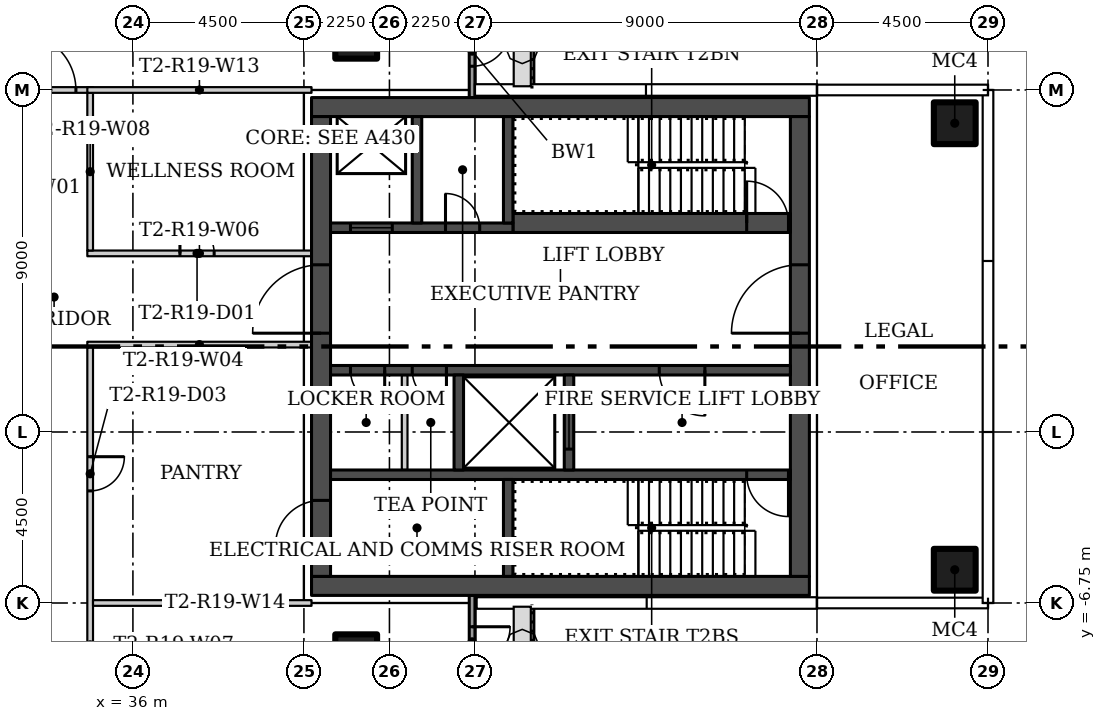
"""IFC4 building model, lengths in metres.
Left out: names, types, materials, properties, quantities, classifications, styles, units other than length and angle.
Written with IfcOpenShell. Run it as: python <this file> out.ifc"""

import sys

from ifc_helpers import new_model, si_unit, direction, frame, frame_2d, origin, origin_2d, place, context, subcontext, project, spatial, rectangle, hollow_rectangle, extrude, element, fill, save


model = new_model("IFC4")
c1 = context("Model", 3, precision=1e-05, world=origin(), true_north=direction((0.0, 1.0)))
c2 = subcontext(c1, "Body", "Model", "MODEL_VIEW")
j1 = project(units=[si_unit("LENGTHUNIT", "METRE"), si_unit("PLANEANGLEUNIT", "RADIAN")], contexts=[c1])
p1 = place(None, origin())
s1 = spatial("IfcSite", under=j1, at=p1, CompositionType="ELEMENT")
p2 = place(p1, origin())
s2 = spatial("IfcBuilding", under=s1, at=p2, CompositionType="ELEMENT")
p3 = place(p2, frame((0.0, 0.0, 174.0)))
s3 = spatial("IfcBuildingStorey", under=s2, at=p3, CompositionType="ELEMENT", Elevation=174.0)
for number, where in (
    (1, (41.875, 8.125, 0.0)),
    (2, (41.875, -8.125, 0.0)),
    (3, (57.625, -5.875, 0.0)),
    (4, (57.625, 5.875, 0.0)),
):
    element("IfcColumn", number, at=place(p3, frame(where)), inside=s3, PredefinedType="COLUMN", context=c2, shape_type="SweptSolid", body=[
        extrude(hollow_rectangle(XDim=1.1, YDim=1.1, WallThickness=0.04, at=origin_2d()), origin(), (0.0, 0.0, 1.0), 3.45),
    ])
p4 = place(p3, frame((40.7, 0.05, 0.0), z_axis=(0.0, 0.0, 1.0), x_axis=(-1.0, 0.0, 0.0)))
e5 = element("IfcWall", 5, at=p4, inside=s3, PredefinedType="PARTITIONING", context=c2, shape_type="SweptSolid", body=[
    extrude(rectangle(XDim=5.9, YDim=0.15, at=frame_2d((2.95, 0.0))), origin(), (0.0, 0.0, 1.0), 3.45),
])
p5 = place(p3, frame((34.8, 2.45, 0.0)))
e6 = element("IfcWall", 6, at=p5, inside=s3, PredefinedType="PARTITIONING", context=c2, shape_type="SweptSolid", body=[
    extrude(rectangle(XDim=5.9, YDim=0.15, at=frame_2d((2.95, 0.0))), origin(), (0.0, 0.0, 1.0), 3.45),
])
p6 = place(p5, frame((2.438, 0.0, 0.0)))
e7 = element("IfcOpeningElement", 7, at=p6, cuts=e6, PredefinedType="OPENING", context=c2, shape_type="SweptSolid", body=[
    extrude(rectangle(XDim=0.9, YDim=2.1, at=frame_2d((0.45, 1.05))), frame((0.0, 0.085, 0.0), z_axis=(0.0, -1.0, 0.0), x_axis=(1.0, 0.0, 0.0)), (0.0, 0.0, 1.0), 0.17),
])
p7 = place(p3, frame((34.875, -0.025, 0.0), z_axis=(0.0, 0.0, 1.0), x_axis=(0.0, -1.0, 0.0)))
e8 = element("IfcWall", 8, at=p7, inside=s3, PredefinedType="PARTITIONING", context=c2, shape_type="SweptSolid", body=[
    extrude(rectangle(XDim=15.65, YDim=0.15, at=frame_2d((7.825, 0.0))), origin(), (0.0, 0.0, 1.0), 3.45),
])
p8 = place(p7, frame((10.725, 0.0, 0.0)))
e9 = element("IfcOpeningElement", 9, at=p8, cuts=e8, PredefinedType="OPENING", context=c2, shape_type="SweptSolid", body=[
    extrude(rectangle(XDim=1.0, YDim=2.4, at=frame_2d((0.5, 1.2))), frame((0.0, 0.085, 0.0), z_axis=(0.0, -1.0, 0.0), x_axis=(1.0, 0.0, 0.0)), (0.0, 0.0, 1.0), 0.17),
])
p9 = place(p7, frame((2.875, 0.0, 0.0)))
e10 = element("IfcOpeningElement", 10, at=p9, cuts=e8, PredefinedType="OPENING", context=c2, shape_type="SweptSolid", body=[
    extrude(rectangle(XDim=0.9, YDim=2.1, at=frame_2d((0.45, 1.05))), frame((0.0, 0.085, 0.0), z_axis=(0.0, -1.0, 0.0), x_axis=(1.0, 0.0, 0.0)), (0.0, 0.0, 1.0), 0.17),
])
p10 = place(p3, frame((34.875, 6.675, 0.0), z_axis=(0.0, 0.0, 1.0), x_axis=(0.0, -1.0, 0.0)))
e11 = element("IfcWall", 11, at=p10, inside=s3, PredefinedType="PARTITIONING", context=c2, shape_type="SweptSolid", body=[
    extrude(rectangle(XDim=4.15, YDim=0.15, at=frame_2d((2.075, 0.0))), origin(), (0.0, 0.0, 1.0), 3.45),
])
p11 = place(p3, frame((32.575, 6.75, 0.0)))
e12 = element("IfcWall", 12, at=p11, inside=s3, PredefinedType="PARTITIONING", context=c2, shape_type="SweptSolid", body=[
    extrude(rectangle(XDim=2.375, YDim=0.15, at=frame_2d((1.188, 0.0))), origin(), (0.0, 0.0, 1.0), 3.45),
])
p12 = place(p11, frame((0.425, 0.0, 0.0)))
e13 = element("IfcOpeningElement", 13, at=p12, cuts=e12, PredefinedType="OPENING", context=c2, shape_type="SweptSolid", body=[
    extrude(rectangle(XDim=1.5, YDim=2.1, at=frame_2d((0.75, 1.05))), frame((0.0, 0.085, 0.0), z_axis=(0.0, -1.0, 0.0), x_axis=(1.0, 0.0, 0.0)), (0.0, 0.0, 1.0), 0.17),
])
p13 = place(p3, frame((40.7, 6.75, 0.0), z_axis=(0.0, 0.0, 1.0), x_axis=(-1.0, 0.0, 0.0)))
e14 = element("IfcWall", 14, at=p13, inside=s3, PredefinedType="PARTITIONING", context=c2, shape_type="SweptSolid", body=[
    extrude(rectangle(XDim=5.9, YDim=0.15, at=frame_2d((2.95, 0.0))), origin(), (0.0, 0.0, 1.0), 3.45),
])
p14 = place(p3, frame((34.95, -6.75, 0.0)))
e15 = element("IfcWall", 15, at=p14, inside=s3, PredefinedType="PARTITIONING", context=c2, shape_type="SweptSolid", body=[
    extrude(rectangle(XDim=5.75, YDim=0.15, at=frame_2d((2.875, 0.0))), origin(), (0.0, 0.0, 1.0), 3.45),
])
p15 = place(p3, frame((44.925, 9.0, 0.0), z_axis=(0.0, 0.0, 1.0), x_axis=(0.0, -1.0, 0.0)))
e16 = element("IfcWall", 16, at=p15, inside=s3, PredefinedType="SOLIDWALL", context=c2, shape_type="SweptSolid", body=[
    extrude(rectangle(XDim=2.457, YDim=0.15, at=frame_2d((1.229, 0.0))), origin(), (0.0, 0.0, 1.0), 3.45),
])
p16 = place(p15, frame((0.625, 0.0, 0.0)))
e17 = element("IfcOpeningElement", 17, at=p16, cuts=e16, PredefinedType="OPENING", context=c2, shape_type="SweptSolid", body=[
    extrude(rectangle(XDim=1.0, YDim=2.4, at=frame_2d((0.5, 1.2))), frame((0.0, 0.085, 0.0), z_axis=(0.0, -1.0, 0.0), x_axis=(1.0, 0.0, 0.0)), (0.0, 0.0, 1.0), 0.17),
])
p17 = place(p3, frame((44.925, -6.543, 0.0), z_axis=(0.0, 0.0, 1.0), x_axis=(0.0, -1.0, 0.0)))
e18 = element("IfcWall", 18, at=p17, inside=s3, PredefinedType="SOLIDWALL", context=c2, shape_type="SweptSolid", body=[
    extrude(rectangle(XDim=2.457, YDim=0.15, at=frame_2d((1.229, 0.0))), origin(), (0.0, 0.0, 1.0), 3.45),
])
p18 = place(p17, frame((0.832, 0.0, 0.0)))
e19 = element("IfcOpeningElement", 19, at=p18, cuts=e18, PredefinedType="OPENING", context=c2, shape_type="SweptSolid", body=[
    extrude(rectangle(XDim=1.0, YDim=2.4, at=frame_2d((0.5, 1.2))), frame((0.0, 0.085, 0.0), z_axis=(0.0, -1.0, 0.0), x_axis=(1.0, 0.0, 0.0)), (0.0, 0.0, 1.0), 0.17),
])
for number, where, z_axis, x_axis in (
    (20, (53.8, -6.3, 0.0), (0.0, 0.0, 1.0), (-1.0, 0.0, 0.0)),
    (21, (53.8, 6.3, 0.0), (0.0, 0.0, 1.0), (-1.0, 0.0, 0.0)),
):
    element("IfcWall", number, at=place(p3, frame(where, z_axis=z_axis, x_axis=x_axis)), inside=s3, PredefinedType="SHEAR", context=c2, shape_type="SweptSolid", body=[
        extrude(rectangle(XDim=13.1, YDim=0.5, at=frame_2d((6.55, 0.0))), origin(), (0.0, 0.0, 1.0), 3.45),
    ])
p19 = place(p3, frame((53.55, -6.05, 0.0), z_axis=(0.0, 0.0, 1.0), x_axis=(0.0, 1.0, 0.0)))
e22 = element("IfcWall", 22, at=p19, inside=s3, PredefinedType="SHEAR", context=c2, shape_type="SweptSolid", body=[
    extrude(rectangle(XDim=12.1, YDim=0.5, at=frame_2d((6.05, 0.0))), origin(), (0.0, 0.0, 1.0), 3.45),
])
p20 = place(p19, frame((6.4, 0.0, 0.0)))
e23 = element("IfcOpeningElement", 23, at=p20, cuts=e22, PredefinedType="OPENING", context=c2, shape_type="SweptSolid", body=[
    extrude(rectangle(XDim=1.8, YDim=2.4, at=frame_2d((0.9, 1.2))), frame((0.0, 0.26, 0.0), z_axis=(0.0, -1.0, 0.0), x_axis=(1.0, 0.0, 0.0)), (0.0, 0.0, 1.0), 0.52),
])
p21 = place(p3, frame((40.95, -6.05, 0.0), z_axis=(0.0, 0.0, 1.0), x_axis=(0.0, 1.0, 0.0)))
e24 = element("IfcWall", 24, at=p21, inside=s3, PredefinedType="SHEAR", context=c2, shape_type="SweptSolid", body=[
    extrude(rectangle(XDim=12.1, YDim=0.5, at=frame_2d((6.05, 0.0))), origin(), (0.0, 0.0, 1.0), 3.45),
])
p22 = place(p21, frame((0.8, 0.0, 0.0)))
e25 = element("IfcOpeningElement", 25, at=p22, cuts=e24, PredefinedType="OPENING", context=c2, shape_type="SweptSolid", body=[
    extrude(rectangle(XDim=1.2, YDim=2.1, at=frame_2d((0.6, 1.05))), frame((0.0, 0.26, 0.0), z_axis=(0.0, -1.0, 0.0), x_axis=(1.0, 0.0, 0.0)), (0.0, 0.0, 1.0), 0.52),
])
p23 = place(p21, frame((6.4, 0.0, 0.0)))
e26 = element("IfcOpeningElement", 26, at=p23, cuts=e24, PredefinedType="OPENING", context=c2, shape_type="SweptSolid", body=[
    extrude(rectangle(XDim=1.8, YDim=2.4, at=frame_2d((0.9, 1.2))), frame((0.0, 0.26, 0.0), z_axis=(0.0, -1.0, 0.0), x_axis=(1.0, 0.0, 0.0)), (0.0, 0.0, 1.0), 0.52),
])
p24 = place(p3, frame((53.3, -3.375, 0.0), z_axis=(0.0, 0.0, 1.0), x_axis=(-1.0, 0.0, 0.0)))
e27 = element("IfcWall", 27, at=p24, inside=s3, PredefinedType="SHEAR", context=c2, shape_type="SweptSolid", body=[
    extrude(rectangle(XDim=12.1, YDim=0.25, at=frame_2d((6.05, 0.0))), origin(), (0.0, 0.0, 1.0), 3.45),
])
p25 = place(p24, frame((0.05, 0.0, 0.0)))
e28 = element("IfcOpeningElement", 28, at=p25, cuts=e27, PredefinedType="OPENING", context=c2, shape_type="SweptSolid", body=[
    extrude(rectangle(XDim=1.1, YDim=2.1, at=frame_2d((0.55, 1.05))), frame((0.0, 0.135, 0.0), z_axis=(0.0, -1.0, 0.0), x_axis=(1.0, 0.0, 0.0)), (0.0, 0.0, 1.0), 0.27),
])
p26 = place(p3, frame((45.875, -6.05, 0.0), z_axis=(0.0, 0.0, 1.0), x_axis=(0.0, 1.0, 0.0)))
e29 = element("IfcWall", 29, at=p26, inside=s3, PredefinedType="SHEAR", context=c2, shape_type="SweptSolid", body=[
    extrude(rectangle(XDim=2.55, YDim=0.25, at=frame_2d((1.275, 0.0))), origin(), (0.0, 0.0, 1.0), 3.45),
])
p27 = place(p3, frame((53.3, -0.625, 0.0), z_axis=(0.0, 0.0, 1.0), x_axis=(-1.0, 0.0, 0.0)))
e30 = element("IfcWall", 30, at=p27, inside=s3, PredefinedType="SHEAR", context=c2, shape_type="SweptSolid", body=[
    extrude(rectangle(XDim=12.1, YDim=0.25, at=frame_2d((6.05, 0.0))), origin(), (0.0, 0.0, 1.0), 3.45),
])
p28 = place(p27, frame((2.25, 0.0, 0.0)))
e31 = element("IfcOpeningElement", 31, at=p28, cuts=e30, PredefinedType="OPENING", context=c2, shape_type="SweptSolid", body=[
    extrude(rectangle(XDim=1.2, YDim=2.1, at=frame_2d((0.6, 1.05))), frame((0.0, 0.135, 0.0), z_axis=(0.0, -1.0, 0.0), x_axis=(1.0, 0.0, 0.0)), (0.0, 0.0, 1.0), 0.27),
])
p29 = place(p27, frame((9.05, 0.0, 0.0)))
e32 = element("IfcOpeningElement", 32, at=p29, cuts=e30, PredefinedType="OPENING", context=c2, shape_type="SweptSolid", body=[
    extrude(rectangle(XDim=0.9, YDim=2.1, at=frame_2d((0.45, 1.05))), frame((0.0, 0.135, 0.0), z_axis=(0.0, -1.0, 0.0), x_axis=(1.0, 0.0, 0.0)), (0.0, 0.0, 1.0), 0.27),
])
p30 = place(p27, frame((10.675, 0.0, 0.0)))
e33 = element("IfcOpeningElement", 33, at=p30, cuts=e30, PredefinedType="OPENING", context=c2, shape_type="SweptSolid", body=[
    extrude(rectangle(XDim=0.9, YDim=2.1, at=frame_2d((0.45, 1.05))), frame((0.0, 0.135, 0.0), z_axis=(0.0, -1.0, 0.0), x_axis=(1.0, 0.0, 0.0)), (0.0, 0.0, 1.0), 0.27),
])
p31 = place(p3, frame((47.475, -3.25, 0.0), z_axis=(0.0, 0.0, 1.0), x_axis=(0.0, 1.0, 0.0)))
e34 = element("IfcWall", 34, at=p31, inside=s3, PredefinedType="SHEAR", context=c2, shape_type="SweptSolid", body=[
    extrude(rectangle(XDim=2.5, YDim=0.25, at=frame_2d((1.25, 0.0))), origin(), (0.0, 0.0, 1.0), 3.45),
])
p32 = place(p31, frame((0.55, 0.0, 0.0)))
e35 = element("IfcOpeningElement", 35, at=p32, cuts=e34, PredefinedType="OPENING", context=c2, shape_type="SweptSolid", body=[
    extrude(rectangle(XDim=1.4, YDim=2.4, at=frame_2d((0.7, 1.2))), frame((0.0, 0.135, 0.0), z_axis=(0.0, -1.0, 0.0), x_axis=(1.0, 0.0, 0.0)), (0.0, 0.0, 1.0), 0.27),
])
p33 = place(p3, frame((44.575, -3.25, 0.0), z_axis=(0.0, 0.0, 1.0), x_axis=(0.0, 1.0, 0.0)))
e36 = element("IfcWall", 36, at=p33, inside=s3, PredefinedType="SHEAR", context=c2, shape_type="SweptSolid", body=[
    extrude(rectangle(XDim=2.5, YDim=0.25, at=frame_2d((1.25, 0.0))), origin(), (0.0, 0.0, 1.0), 3.45),
])
p34 = place(p3, frame((43.15, -3.25, 0.0), z_axis=(0.0, 0.0, 1.0), x_axis=(0.0, 1.0, 0.0)))
e37 = element("IfcWall", 37, at=p34, inside=s3, PredefinedType="PARTITIONING", context=c2, shape_type="SweptSolid", body=[
    extrude(rectangle(XDim=2.5, YDim=0.15, at=frame_2d((1.25, 0.0))), origin(), (0.0, 0.0, 1.0), 3.45),
])
p35 = place(p3, frame((46.0, 3.25, 0.0)))
e38 = element("IfcWall", 38, at=p35, inside=s3, PredefinedType="SHEAR", context=c2, shape_type="SweptSolid", body=[
    extrude(rectangle(XDim=7.3, YDim=0.5, at=frame_2d((3.65, 0.0))), origin(), (0.0, 0.0, 1.0), 3.45),
])
p36 = place(p35, frame((6.15, 0.0, 0.0)))
e39 = element("IfcOpeningElement", 39, at=p36, cuts=e38, PredefinedType="OPENING", context=c2, shape_type="SweptSolid", body=[
    extrude(rectangle(XDim=1.1, YDim=2.1, at=frame_2d((0.55, 1.05))), frame((0.0, 0.26, 0.0), z_axis=(0.0, -1.0, 0.0), x_axis=(1.0, 0.0, 0.0)), (0.0, 0.0, 1.0), 0.52),
])
p37 = place(p3, frame((41.2, 3.125, 0.0)))
e40 = element("IfcWall", 40, at=p37, inside=s3, PredefinedType="SHEAR", context=c2, shape_type="SweptSolid", body=[
    extrude(rectangle(XDim=4.8, YDim=0.25, at=frame_2d((2.4, 0.0))), origin(), (0.0, 0.0, 1.0), 3.45),
])
p38 = place(p37, frame((0.525, 0.0, 0.0)))
e41 = element("IfcOpeningElement", 41, at=p38, cuts=e40, PredefinedType="OPENING", context=c2, shape_type="SweptSolid", body=[
    extrude(rectangle(XDim=1.1, YDim=2.1, at=frame_2d((0.55, 1.05))), frame((0.0, 0.135, 0.0), z_axis=(0.0, -1.0, 0.0), x_axis=(1.0, 0.0, 0.0)), (0.0, 0.0, 1.0), 0.27),
])
p39 = place(p37, frame((3.025, 0.0, 0.0)))
e42 = element("IfcOpeningElement", 42, at=p39, cuts=e40, PredefinedType="OPENING", context=c2, shape_type="SweptSolid", body=[
    extrude(rectangle(XDim=0.9, YDim=2.1, at=frame_2d((0.45, 1.05))), frame((0.0, 0.135, 0.0), z_axis=(0.0, -1.0, 0.0), x_axis=(1.0, 0.0, 0.0)), (0.0, 0.0, 1.0), 0.27),
])
for number, where, z_axis, x_axis in (
    (43, (45.875, 3.25, 0.0), (0.0, 0.0, 1.0), (0.0, 1.0, 0.0)),
    (44, (43.475, 3.25, 0.0), (0.0, 0.0, 1.0), (0.0, 1.0, 0.0)),
):
    element("IfcWall", number, at=place(p3, frame(where, z_axis=z_axis, x_axis=x_axis)), inside=s3, PredefinedType="SHEAR", context=c2, shape_type="SweptSolid", body=[
        extrude(rectangle(XDim=2.8, YDim=0.25, at=frame_2d((1.4, 0.0))), origin(), (0.0, 0.0, 1.0), 3.45),
    ])
p40 = place(p6, origin())
e45 = element("IfcDoor", 45, at=p40, inside=s3, OperationType="SINGLE_SWING_RIGHT", PredefinedType="DOOR", context=c2, shape_type="SweptSolid", body=[
    extrude(rectangle(XDim=0.9, YDim=2.1, at=frame_2d((0.45, 1.05))), frame((0.0, 0.025, 0.0), z_axis=(0.0, -1.0, 0.0), x_axis=(1.0, 0.0, 0.0)), (0.0, 0.0, 1.0), 0.05),
])
fill(e7, e45)
p41 = place(p9, origin())
e46 = element("IfcDoor", 46, at=p41, inside=s3, OperationType="SINGLE_SWING_LEFT", PredefinedType="DOOR", context=c2, shape_type="SweptSolid", body=[
    extrude(rectangle(XDim=0.9, YDim=2.1, at=frame_2d((0.45, 1.05))), frame((0.0, 0.025, 0.0), z_axis=(0.0, -1.0, 0.0), x_axis=(1.0, 0.0, 0.0)), (0.0, 0.0, 1.0), 0.05),
])
fill(e10, e46)
p42 = place(p12, origin())
e47 = element("IfcDoor", 47, at=p42, inside=s3, OperationType="DOUBLE_DOOR_SINGLE_SWING", PredefinedType="DOOR", context=c2, shape_type="SweptSolid", body=[
    extrude(rectangle(XDim=1.5, YDim=2.1, at=frame_2d((0.75, 1.05))), frame((0.0, 0.025, 0.0), z_axis=(0.0, -1.0, 0.0), x_axis=(1.0, 0.0, 0.0)), (0.0, 0.0, 1.0), 0.05),
])
fill(e13, e47)
p43 = place(p16, origin())
e48 = element("IfcDoor", 48, at=p43, inside=s3, OperationType="SINGLE_SWING_LEFT", PredefinedType="DOOR", context=c2, shape_type="SweptSolid", body=[
    extrude(rectangle(XDim=1.0, YDim=2.4, at=frame_2d((0.5, 1.2))), frame((0.0, 0.025, 0.0), z_axis=(0.0, -1.0, 0.0), x_axis=(1.0, 0.0, 0.0)), (0.0, 0.0, 1.0), 0.05),
])
fill(e17, e48)
p44 = place(p18, origin())
e49 = element("IfcDoor", 49, at=p44, inside=s3, OperationType="SINGLE_SWING_RIGHT", PredefinedType="DOOR", context=c2, shape_type="SweptSolid", body=[
    extrude(rectangle(XDim=1.0, YDim=2.4, at=frame_2d((0.5, 1.2))), frame((0.0, 0.025, 0.0), z_axis=(0.0, -1.0, 0.0), x_axis=(1.0, 0.0, 0.0)), (0.0, 0.0, 1.0), 0.05),
])
fill(e19, e49)
p45 = place(p20, origin())
e50 = element("IfcDoor", 50, at=p45, inside=s3, OperationType="DOUBLE_DOOR_SINGLE_SWING", PredefinedType="DOOR", context=c2, shape_type="SweptSolid", body=[
    extrude(rectangle(XDim=1.8, YDim=2.4, at=frame_2d((0.9, 1.2))), frame((0.0, 0.025, 0.0), z_axis=(0.0, -1.0, 0.0), x_axis=(1.0, 0.0, 0.0)), (0.0, 0.0, 1.0), 0.05),
])
fill(e23, e50)
p46 = place(p22, origin())
e51 = element("IfcDoor", 51, at=p46, inside=s3, OperationType="SINGLE_SWING_LEFT", PredefinedType="DOOR", context=c2, shape_type="SweptSolid", body=[
    extrude(rectangle(XDim=1.2, YDim=2.1, at=frame_2d((0.6, 1.05))), frame((0.0, 0.025, 0.0), z_axis=(0.0, -1.0, 0.0), x_axis=(1.0, 0.0, 0.0)), (0.0, 0.0, 1.0), 0.05),
])
fill(e25, e51)
p47 = place(p23, origin())
e52 = element("IfcDoor", 52, at=p47, inside=s3, OperationType="DOUBLE_DOOR_SINGLE_SWING", PredefinedType="DOOR", context=c2, shape_type="SweptSolid", body=[
    extrude(rectangle(XDim=1.8, YDim=2.4, at=frame_2d((0.9, 1.2))), frame((0.0, 0.025, 0.0), z_axis=(0.0, -1.0, 0.0), x_axis=(1.0, 0.0, 0.0)), (0.0, 0.0, 1.0), 0.05),
])
fill(e26, e52)
p48 = place(p25, origin())
e53 = element("IfcDoor", 53, at=p48, inside=s3, OperationType="SINGLE_SWING_LEFT", PredefinedType="DOOR", context=c2, shape_type="SweptSolid", body=[
    extrude(rectangle(XDim=1.1, YDim=2.1, at=frame_2d((0.55, 1.05))), frame((0.0, 0.025, 0.0), z_axis=(0.0, -1.0, 0.0), x_axis=(1.0, 0.0, 0.0)), (0.0, 0.0, 1.0), 0.05),
])
fill(e28, e53)
p49 = place(p28, origin())
e54 = element("IfcDoor", 54, at=p49, inside=s3, OperationType="SINGLE_SWING_LEFT", PredefinedType="DOOR", context=c2, shape_type="SweptSolid", body=[
    extrude(rectangle(XDim=1.2, YDim=2.1, at=frame_2d((0.6, 1.05))), frame((0.0, 0.025, 0.0), z_axis=(0.0, -1.0, 0.0), x_axis=(1.0, 0.0, 0.0)), (0.0, 0.0, 1.0), 0.05),
])
fill(e31, e54)
p50 = place(p29, origin())
e55 = element("IfcDoor", 55, at=p50, inside=s3, OperationType="SINGLE_SWING_RIGHT", PredefinedType="DOOR", context=c2, shape_type="SweptSolid", body=[
    extrude(rectangle(XDim=0.9, YDim=2.1, at=frame_2d((0.45, 1.05))), frame((0.0, 0.025, 0.0), z_axis=(0.0, -1.0, 0.0), x_axis=(1.0, 0.0, 0.0)), (0.0, 0.0, 1.0), 0.05),
])
fill(e32, e55)
p51 = place(p30, origin())
e56 = element("IfcDoor", 56, at=p51, inside=s3, OperationType="SINGLE_SWING_RIGHT", PredefinedType="DOOR", context=c2, shape_type="SweptSolid", body=[
    extrude(rectangle(XDim=0.9, YDim=2.1, at=frame_2d((0.45, 1.05))), frame((0.0, 0.025, 0.0), z_axis=(0.0, -1.0, 0.0), x_axis=(1.0, 0.0, 0.0)), (0.0, 0.0, 1.0), 0.05),
])
fill(e33, e56)
p52 = place(p32, origin())
e57 = element("IfcDoor", 57, at=p52, inside=s3, OperationType="SLIDING_TO_LEFT", PredefinedType="DOOR", context=c2, shape_type="SweptSolid", body=[
    extrude(rectangle(XDim=1.4, YDim=2.4, at=frame_2d((0.7, 1.2))), frame((0.0, 0.025, 0.0), z_axis=(0.0, -1.0, 0.0), x_axis=(1.0, 0.0, 0.0)), (0.0, 0.0, 1.0), 0.05),
])
fill(e35, e57)
p53 = place(p36, origin())
e58 = element("IfcDoor", 58, at=p53, inside=s3, OperationType="SINGLE_SWING_RIGHT", PredefinedType="DOOR", context=c2, shape_type="SweptSolid", body=[
    extrude(rectangle(XDim=1.1, YDim=2.1, at=frame_2d((0.55, 1.05))), frame((0.0, 0.025, 0.0), z_axis=(0.0, -1.0, 0.0), x_axis=(1.0, 0.0, 0.0)), (0.0, 0.0, 1.0), 0.05),
])
fill(e39, e58)
p54 = place(p38, origin())
e59 = element("IfcDoor", 59, at=p54, inside=s3, OperationType="SLIDING_TO_LEFT", PredefinedType="DOOR", context=c2, shape_type="SweptSolid", body=[
    extrude(rectangle(XDim=1.1, YDim=2.1, at=frame_2d((0.55, 1.05))), frame((0.0, 0.025, 0.0), z_axis=(0.0, -1.0, 0.0), x_axis=(1.0, 0.0, 0.0)), (0.0, 0.0, 1.0), 0.05),
])
fill(e41, e59)
p55 = place(p39, origin())
e60 = element("IfcDoor", 60, at=p55, inside=s3, OperationType="SINGLE_SWING_RIGHT", PredefinedType="DOOR", context=c2, shape_type="SweptSolid", body=[
    extrude(rectangle(XDim=0.9, YDim=2.1, at=frame_2d((0.45, 1.05))), frame((0.0, 0.025, 0.0), z_axis=(0.0, -1.0, 0.0), x_axis=(1.0, 0.0, 0.0)), (0.0, 0.0, 1.0), 0.05),
])
fill(e42, e60)
save(model, sys.argv[1])
